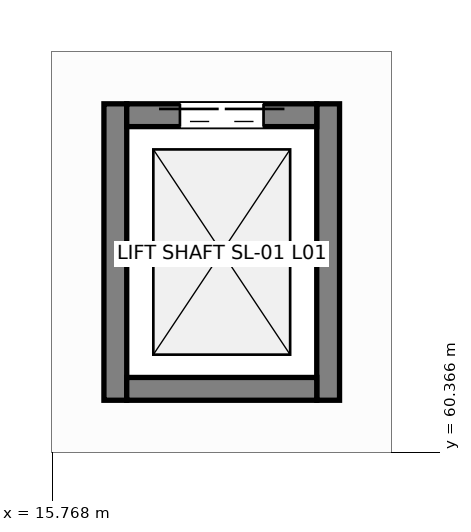
"""IFC4 building model, lengths in metres.
Left out: names, types, materials, properties, quantities, classifications, styles, units other than length and angle.
Written with IfcOpenShell. Run it as: python <this file> out.ifc"""

import sys

from ifc_helpers import new_model, si_unit, direction, frame, frame_2d, origin, place, context, subcontext, project, spatial, rectangle, extrude, element, fill, save


model = new_model("IFC4")
c1 = context("Model", 3, precision=1e-05, world=origin(), true_north=direction((0.0, 1.0)))
c2 = subcontext(c1, "Body", "Model", "MODEL_VIEW")
j1 = project(units=[si_unit("LENGTHUNIT", "METRE"), si_unit("PLANEANGLEUNIT", "RADIAN")], contexts=[c1])
p1 = place(None, origin())
s1 = spatial("IfcSite", under=j1, at=p1, CompositionType="ELEMENT")
p2 = place(p1, origin())
s2 = spatial("IfcBuilding", under=s1, at=p2, CompositionType="ELEMENT")
p3 = place(p2, frame((0.0, 0.0, 4.8)))
s3 = spatial("IfcBuildingStorey", under=s2, at=p3, CompositionType="ELEMENT", Elevation=4.8)
for number, where, z_axis, x_axis in (
    (1, (16.6, 61.05, 0.0), (0.0, 0.0, 1.0), (0.0, 1.0, 0.0)),
    (2, (19.4, 61.05, 0.0), (0.0, 0.0, 1.0), (0.0, 1.0, 0.0)),
):
    element("IfcWall", number, at=place(p3, frame(where, z_axis=z_axis, x_axis=x_axis)), inside=s3, PredefinedType="SHEAR", context=c2, shape_type="SweptSolid", body=[
        extrude(rectangle(XDim=3.9, YDim=0.3, at=frame_2d((1.95, 0.0))), origin(), (0.0, 0.0, 1.0), 3.98),
    ])
p4 = place(p3, frame((16.75, 64.8, 0.0), z_axis=(0.0, 0.0, 1.0), x_axis=(1.0, 0.0, 0.0)))
e3 = element("IfcWall", 3, at=p4, inside=s3, PredefinedType="SHEAR", context=c2, shape_type="SweptSolid", body=[
    extrude(rectangle(XDim=2.5, YDim=0.3, at=frame_2d((1.25, 0.0))), origin(), (0.0, 0.0, 1.0), 3.98),
])
p5 = place(p4, frame((0.7, 0.0, 0.0)))
e4 = element("IfcOpeningElement", 4, at=p5, cuts=e3, PredefinedType="OPENING", context=c2, shape_type="SweptSolid", body=[
    extrude(rectangle(XDim=1.1, YDim=2.15, at=frame_2d((0.55, 1.075))), frame((0.0, 0.16, 0.0), z_axis=(0.0, -1.0, 0.0), x_axis=(1.0, 0.0, 0.0)), (0.0, 0.0, 1.0), 0.32),
])
p6 = place(p3, frame((16.75, 61.2, 0.0), z_axis=(0.0, 0.0, 1.0), x_axis=(1.0, 0.0, 0.0)))
e5 = element("IfcWall", 5, at=p6, inside=s3, PredefinedType="SHEAR", context=c2, shape_type="SweptSolid", body=[
    extrude(rectangle(XDim=2.5, YDim=0.3, at=frame_2d((1.25, 0.0))), origin(), (0.0, 0.0, 1.0), 3.98),
])
p7 = place(p5, origin())
e6 = element("IfcDoor", 6, at=p7, inside=s3, OperationType="DOUBLE_DOOR_SLIDING", PredefinedType="DOOR", context=c2, shape_type="SweptSolid", body=[
    extrude(rectangle(XDim=1.1, YDim=2.15, at=frame_2d((0.55, 1.075))), frame((0.0, 0.025, 0.0), z_axis=(0.0, -1.0, 0.0), x_axis=(1.0, 0.0, 0.0)), (0.0, 0.0, 1.0), 0.05),
])
fill(e4, e6)
save(model, sys.argv[1])
